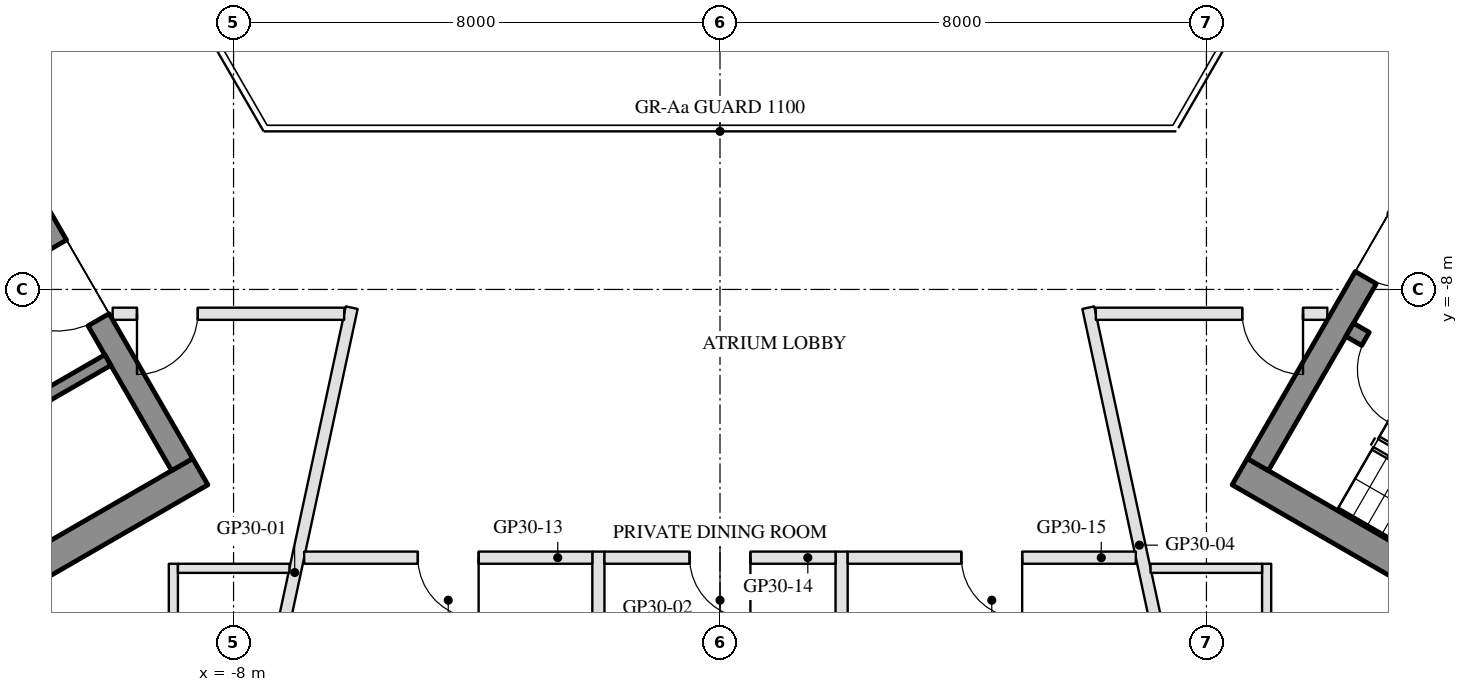
"""IFC4 building model, lengths in metres.
Left out: names, types, materials, properties, quantities, classifications, styles, units other than length and angle.
Written with IfcOpenShell. Run it as: python <this file> out.ifc"""

import sys

from ifc_helpers import new_model, si_unit, direction, frame, frame_2d, origin, place, context, subcontext, project, spatial, rectangle, extrude, element, fill, save


model = new_model("IFC4")
c1 = context("Model", 3, precision=1e-05, world=origin(), true_north=direction((0.0, 1.0)))
c2 = subcontext(c1, "Body", "Model", "MODEL_VIEW")
j1 = project(units=[si_unit("LENGTHUNIT", "METRE"), si_unit("PLANEANGLEUNIT", "RADIAN")], contexts=[c1])
p1 = place(None, origin())
s1 = spatial("IfcSite", under=j1, at=p1, CompositionType="ELEMENT")
p2 = place(p1, origin())
s2 = spatial("IfcBuilding", under=s1, at=p2, CompositionType="ELEMENT")
p3 = place(p2, frame((0.0, 0.0, 298.5)))
s3 = spatial("IfcBuildingStorey", under=s2, at=p3, CompositionType="ELEMENT", Elevation=298.5)
p4 = place(p3, frame((-8.547, -10.997, 0.0), z_axis=(0.0, 0.0, 1.0), x_axis=(-0.866025449148, -0.499999921427, 0.0)))
e1 = element("IfcWall", 1, at=p4, inside=s3, PredefinedType="SHEAR", context=c2, shape_type="SweptSolid", body=[
    extrude(rectangle(XDim=11.222, YDim=0.5, at=frame_2d((5.611, 0.0))), origin(), (0.0, 0.0, 1.0), 3.5),
])
p5 = place(p3, frame((-13.845, -2.22, 0.0), z_axis=(0.0, 0.0, 1.0), x_axis=(0.500004234368, -0.866022959057, 0.0)))
e2 = element("IfcWall", 2, at=p5, inside=s3, PredefinedType="SHEAR", context=c2, shape_type="SweptSolid", body=[
    extrude(rectangle(XDim=10.0, YDim=0.4, at=frame_2d((5.0, 0.0))), origin(), (0.0, 0.0, 1.0), 3.5),
])
p6 = place(p5, frame((3.55, 0.0, 0.0)))
e3 = element("IfcOpeningElement", 3, at=p6, cuts=e2, PredefinedType="OPENING", context=c2, shape_type="SweptSolid", body=[
    extrude(rectangle(XDim=1.1, YDim=2.1, at=frame_2d((0.55, 1.05))), frame((0.0, 0.21, 0.0), z_axis=(0.0, -1.0, 0.0), x_axis=(1.0, 0.0, 0.0)), (0.0, 0.0, 1.0), 0.42),
])
p7 = place(p5, frame((5.85, 0.0, 0.0)))
e4 = element("IfcOpeningElement", 4, at=p7, cuts=e2, PredefinedType="OPENING", context=c2, shape_type="SweptSolid", body=[
    extrude(rectangle(XDim=1.4, YDim=2.1, at=frame_2d((0.7, 1.05))), frame((0.0, 0.21, 0.0), z_axis=(0.0, -1.0, 0.0), x_axis=(1.0, 0.0, 0.0)), (0.0, 0.0, 1.0), 0.42),
])
p8 = place(p3, frame((-10.068, -9.162, 0.0), z_axis=(0.0, 0.0, 1.0), x_axis=(-0.866032725843, -0.499987317609, 0.0)))
e5 = element("IfcWall", 5, at=p8, inside=s3, PredefinedType="SHEAR", context=c2, shape_type="SweptSolid", body=[
    extrude(rectangle(XDim=10.16, YDim=0.2, at=frame_2d((5.08, 0.0))), origin(), (0.0, 0.0, 1.0), 3.5),
])
p9 = place(p8, frame((4.53, 0.0, 0.0)))
e6 = element("IfcOpeningElement", 6, at=p9, cuts=e5, PredefinedType="OPENING", context=c2, shape_type="SweptSolid", body=[
    extrude(rectangle(XDim=0.9, YDim=2.1, at=frame_2d((0.45, 1.05))), frame((0.0, 0.11, 0.0), z_axis=(0.0, -1.0, 0.0), x_axis=(1.0, 0.0, 0.0)), (0.0, 0.0, 1.0), 0.22),
])
p10 = place(p3, frame((8.547, -10.997, 0.0), z_axis=(0.0, 0.0, 1.0), x_axis=(0.866025449148, -0.499999921427, 0.0)))
e7 = element("IfcWall", 7, at=p10, inside=s3, PredefinedType="SHEAR", context=c2, shape_type="SweptSolid", body=[
    extrude(rectangle(XDim=11.222, YDim=0.5, at=frame_2d((5.611, 0.0))), origin(), (0.0, 0.0, 1.0), 3.5),
])
p11 = place(p3, frame((8.845, -10.88, 0.0), z_axis=(0.0, 0.0, 1.0), x_axis=(0.500004234368, 0.866022959057, 0.0)))
e8 = element("IfcWall", 8, at=p11, inside=s3, PredefinedType="SHEAR", context=c2, shape_type="SweptSolid", body=[
    extrude(rectangle(XDim=10.0, YDim=0.4, at=frame_2d((5.0, 0.0))), origin(), (0.0, 0.0, 1.0), 3.5),
])
p12 = place(p11, frame((3.55, 0.0, 0.0)))
e9 = element("IfcOpeningElement", 9, at=p12, cuts=e8, PredefinedType="OPENING", context=c2, shape_type="SweptSolid", body=[
    extrude(rectangle(XDim=1.1, YDim=2.1, at=frame_2d((0.55, 1.05))), frame((0.0, 0.21, 0.0), z_axis=(0.0, -1.0, 0.0), x_axis=(1.0, 0.0, 0.0)), (0.0, 0.0, 1.0), 0.42),
])
p13 = place(p11, frame((5.85, 0.0, 0.0)))
e10 = element("IfcOpeningElement", 10, at=p13, cuts=e8, PredefinedType="OPENING", context=c2, shape_type="SweptSolid", body=[
    extrude(rectangle(XDim=1.4, YDim=2.1, at=frame_2d((0.7, 1.05))), frame((0.0, 0.21, 0.0), z_axis=(0.0, -1.0, 0.0), x_axis=(1.0, 0.0, 0.0)), (0.0, 0.0, 1.0), 0.42),
])
p14 = place(p3, frame((10.356, -8.664, 0.0), z_axis=(0.0, 0.0, 1.0), x_axis=(0.866028629588, -0.499994412703, 0.0)))
e11 = element("IfcWall", 11, at=p14, inside=s3, PredefinedType="SHEAR", context=c2, shape_type="SweptSolid", body=[
    extrude(rectangle(XDim=6.45, YDim=0.25, at=frame_2d((3.225, 0.0))), origin(), (0.0, 0.0, 1.0), 3.5),
])
p15 = place(p14, frame((0.3, 0.0, 0.0)))
e12 = element("IfcOpeningElement", 12, at=p15, cuts=e11, PredefinedType="OPENING", context=c2, shape_type="SweptSolid", body=[
    extrude(rectangle(XDim=1.0, YDim=2.1, at=frame_2d((0.5, 1.05))), frame((0.0, 0.135, 0.0), z_axis=(0.0, -1.0, 0.0), x_axis=(1.0, 0.0, 0.0)), (0.0, 0.0, 1.0), 0.27),
])
p16 = place(p3, frame((-7.93, -17.012, 0.0), z_axis=(0.0, 0.0, 1.0), x_axis=(0.210200768645, 0.97765824134, 0.0)))
e13 = element("IfcWall", 13, at=p16, inside=s3, PredefinedType="PARTITIONING", context=c2, shape_type="SweptSolid", body=[
    extrude(rectangle(XDim=8.911, YDim=0.2, at=frame_2d((4.455, 0.0))), origin(), (0.0, 0.0, 1.0), 3.1),
])
p17 = place(p3, frame((-2.0, -16.112, 0.0), z_axis=(0.0, 0.0, 1.0), x_axis=(0.0, 1.0, 0.0)))
e14 = element("IfcWall", 14, at=p17, inside=s3, PredefinedType="PARTITIONING", context=c2, shape_type="SweptSolid", body=[
    extrude(rectangle(XDim=3.8, YDim=0.2, at=frame_2d((1.9, 0.0))), origin(), (0.0, 0.0, 1.0), 3.1),
])
p18 = place(p3, frame((2.0, -17.012, 0.0), z_axis=(0.0, 0.0, 1.0), x_axis=(0.0, 1.0, 0.0)))
e15 = element("IfcWall", 15, at=p18, inside=s3, PredefinedType="PARTITIONING", context=c2, shape_type="SweptSolid", body=[
    extrude(rectangle(XDim=4.7, YDim=0.2, at=frame_2d((2.35, 0.0))), origin(), (0.0, 0.0, 1.0), 3.1),
])
p19 = place(p3, frame((7.737, -16.112, 0.0), z_axis=(0.0, 0.0, 1.0), x_axis=(-0.210221826162, 0.977653713646, 0.0)))
e16 = element("IfcWall", 16, at=p19, inside=s3, PredefinedType="PARTITIONING", context=c2, shape_type="SweptSolid", body=[
    extrude(rectangle(XDim=7.99, YDim=0.2, at=frame_2d((3.995, 0.0))), origin(), (0.0, 0.0, 1.0), 3.1),
])
p20 = place(p3, frame((-6.181, -8.4, 0.0), z_axis=(0.0, 0.0, 1.0), x_axis=(-1.0, 0.0, 0.0)))
e17 = element("IfcWall", 17, at=p20, inside=s3, PredefinedType="PARTITIONING", context=c2, shape_type="SweptSolid", body=[
    extrude(rectangle(XDim=3.807, YDim=0.2, at=frame_2d((1.904, 0.0))), origin(), (0.0, 0.0, 1.0), 3.1),
])
p21 = place(p20, frame((2.407, 0.0, 0.0)))
e18 = element("IfcOpeningElement", 18, at=p21, cuts=e17, PredefinedType="OPENING", context=c2, shape_type="SweptSolid", body=[
    extrude(rectangle(XDim=1.0, YDim=2.1, at=frame_2d((0.5, 1.05))), frame((0.0, 0.11, 0.0), z_axis=(0.0, -1.0, 0.0), x_axis=(1.0, 0.0, 0.0)), (0.0, 0.0, 1.0), 0.22),
])
p22 = place(p3, frame((-8.99, -12.512, 0.0), z_axis=(0.0, 0.0, 1.0), x_axis=(0.0, -1.0, 0.0)))
e19 = element("IfcWall", 19, at=p22, inside=s3, PredefinedType="PARTITIONING", context=c2, shape_type="SweptSolid", body=[
    extrude(rectangle(XDim=2.8, YDim=0.15, at=frame_2d((1.4, 0.0))), origin(), (0.0, 0.0, 1.0), 3.1),
])
p23 = place(p22, frame((1.4, 0.0, 0.0)))
e20 = element("IfcOpeningElement", 20, at=p23, cuts=e19, PredefinedType="OPENING", context=c2, shape_type="SweptSolid", body=[
    extrude(rectangle(XDim=0.9, YDim=2.1, at=frame_2d((0.45, 1.05))), frame((0.0, 0.085, 0.0), z_axis=(0.0, -1.0, 0.0), x_axis=(1.0, 0.0, 0.0)), (0.0, 0.0, 1.0), 0.17),
])
p24 = place(p3, frame((-8.915, -12.587, 0.0), z_axis=(0.0, 0.0, 1.0), x_axis=(1.0, 0.0, 0.0)))
e21 = element("IfcWall", 21, at=p24, inside=s3, PredefinedType="PARTITIONING", context=c2, shape_type="SweptSolid", body=[
    extrude(rectangle(XDim=1.834, YDim=0.15, at=frame_2d((0.917, 0.0))), origin(), (0.0, 0.0, 1.0), 3.55),
])
p25 = place(p3, frame((-2.1, -12.412, 0.0), z_axis=(0.0, 0.0, 1.0), x_axis=(-1.0, 0.0, 0.0)))
e22 = element("IfcWall", 22, at=p25, inside=s3, PredefinedType="PARTITIONING", context=c2, shape_type="SweptSolid", body=[
    extrude(rectangle(XDim=4.739, YDim=0.2, at=frame_2d((2.369, 0.0))), origin(), (0.0, 0.0, 1.0), 3.1),
])
p26 = place(p25, frame((1.869, 0.0, 0.0)))
e23 = element("IfcOpeningElement", 23, at=p26, cuts=e22, PredefinedType="OPENING", context=c2, shape_type="SweptSolid", body=[
    extrude(rectangle(XDim=1.0, YDim=2.1, at=frame_2d((0.5, 1.05))), frame((0.0, 0.11, 0.0), z_axis=(0.0, -1.0, 0.0), x_axis=(1.0, 0.0, 0.0)), (0.0, 0.0, 1.0), 0.22),
])
p27 = place(p3, frame((1.9, -12.412, 0.0), z_axis=(0.0, 0.0, 1.0), x_axis=(-1.0, 0.0, 0.0)))
e24 = element("IfcWall", 24, at=p27, inside=s3, PredefinedType="PARTITIONING", context=c2, shape_type="SweptSolid", body=[
    extrude(rectangle(XDim=3.8, YDim=0.2, at=frame_2d((1.9, 0.0))), origin(), (0.0, 0.0, 1.0), 3.1),
])
p28 = place(p27, frame((1.4, 0.0, 0.0)))
e25 = element("IfcOpeningElement", 25, at=p28, cuts=e24, PredefinedType="OPENING", context=c2, shape_type="SweptSolid", body=[
    extrude(rectangle(XDim=1.0, YDim=2.1, at=frame_2d((0.5, 1.05))), frame((0.0, 0.11, 0.0), z_axis=(0.0, -1.0, 0.0), x_axis=(1.0, 0.0, 0.0)), (0.0, 0.0, 1.0), 0.22),
])
p29 = place(p3, frame((6.839, -12.412, 0.0), z_axis=(0.0, 0.0, 1.0), x_axis=(-1.0, 0.0, 0.0)))
e26 = element("IfcWall", 26, at=p29, inside=s3, PredefinedType="PARTITIONING", context=c2, shape_type="SweptSolid", body=[
    extrude(rectangle(XDim=4.739, YDim=0.2, at=frame_2d((2.369, 0.0))), origin(), (0.0, 0.0, 1.0), 3.1),
])
p30 = place(p29, frame((1.869, 0.0, 0.0)))
e27 = element("IfcOpeningElement", 27, at=p30, cuts=e26, PredefinedType="OPENING", context=c2, shape_type="SweptSolid", body=[
    extrude(rectangle(XDim=1.0, YDim=2.1, at=frame_2d((0.5, 1.05))), frame((0.0, 0.11, 0.0), z_axis=(0.0, -1.0, 0.0), x_axis=(1.0, 0.0, 0.0)), (0.0, 0.0, 1.0), 0.22),
])
p31 = place(p3, frame((9.988, -8.4, 0.0), z_axis=(0.0, 0.0, 1.0), x_axis=(-1.0, 0.0, 0.0)))
e28 = element("IfcWall", 28, at=p31, inside=s3, PredefinedType="PARTITIONING", context=c2, shape_type="SweptSolid", body=[
    extrude(rectangle(XDim=3.807, YDim=0.2, at=frame_2d((1.904, 0.0))), origin(), (0.0, 0.0, 1.0), 3.1),
])
p32 = place(p31, frame((0.4, 0.0, 0.0)))
e29 = element("IfcOpeningElement", 29, at=p32, cuts=e28, PredefinedType="OPENING", context=c2, shape_type="SweptSolid", body=[
    extrude(rectangle(XDim=1.0, YDim=2.1, at=frame_2d((0.5, 1.05))), frame((0.0, 0.11, 0.0), z_axis=(0.0, -1.0, 0.0), x_axis=(1.0, 0.0, 0.0)), (0.0, 0.0, 1.0), 0.22),
])
p33 = place(p3, frame((8.99, -15.312, 0.0), z_axis=(0.0, 0.0, 1.0), x_axis=(0.0, 1.0, 0.0)))
e30 = element("IfcWall", 30, at=p33, inside=s3, PredefinedType="PARTITIONING", context=c2, shape_type="SweptSolid", body=[
    extrude(rectangle(XDim=2.8, YDim=0.15, at=frame_2d((1.4, 0.0))), origin(), (0.0, 0.0, 1.0), 3.1),
])
p34 = place(p33, frame((0.5, 0.0, 0.0)))
e31 = element("IfcOpeningElement", 31, at=p34, cuts=e30, PredefinedType="OPENING", context=c2, shape_type="SweptSolid", body=[
    extrude(rectangle(XDim=0.9, YDim=2.1, at=frame_2d((0.45, 1.05))), frame((0.0, 0.085, 0.0), z_axis=(0.0, -1.0, 0.0), x_axis=(1.0, 0.0, 0.0)), (0.0, 0.0, 1.0), 0.17),
])
p35 = place(p3, frame((7.081, -12.587, 0.0), z_axis=(0.0, 0.0, 1.0), x_axis=(1.0, 0.0, 0.0)))
e32 = element("IfcWall", 32, at=p35, inside=s3, PredefinedType="PARTITIONING", context=c2, shape_type="SweptSolid", body=[
    extrude(rectangle(XDim=1.834, YDim=0.15, at=frame_2d((0.917, 0.0))), origin(), (0.0, 0.0, 1.0), 3.55),
])
p36 = place(p3, frame((8.275, 2.468, 0.0), z_axis=(0.0, 0.0, 1.0), x_axis=(0.500004647933, -0.866022720283, 0.0)))
e33 = element("IfcWall", 33, at=p36, inside=s3, PredefinedType="PARTITIONING", context=c2, shape_type="SweptSolid", body=[
    extrude(rectangle(XDim=7.988, YDim=0.2, at=frame_2d((3.994, 0.0))), origin(), (0.0, 0.0, 1.0), 3.1),
])
p37 = place(p36, frame((2.45, 0.0, 0.0)))
e34 = element("IfcOpeningElement", 34, at=p37, cuts=e33, PredefinedType="OPENING", context=c2, shape_type="SweptSolid", body=[
    extrude(rectangle(XDim=1.0, YDim=2.1, at=frame_2d((0.5, 1.05))), frame((0.0, 0.11, 0.0), z_axis=(0.0, -1.0, 0.0), x_axis=(1.0, 0.0, 0.0)), (0.0, 0.0, 1.0), 0.22),
])
p38 = place(p3, frame((-12.269, -4.45, 0.0), z_axis=(0.0, 0.0, 1.0), x_axis=(0.500016364551, 0.8660159555, 0.0)))
e35 = element("IfcWall", 35, at=p38, inside=s3, PredefinedType="PARTITIONING", context=c2, shape_type="SweptSolid", body=[
    extrude(rectangle(XDim=10.091, YDim=0.2, at=frame_2d((5.045, 0.0))), origin(), (0.0, 0.0, 1.0), 3.1),
])
p39 = place(p38, frame((6.638, 0.0, 0.0)))
e36 = element("IfcOpeningElement", 36, at=p39, cuts=e35, PredefinedType="OPENING", context=c2, shape_type="SweptSolid", body=[
    extrude(rectangle(XDim=1.0, YDim=2.1, at=frame_2d((0.5, 1.05))), frame((0.0, 0.11, 0.0), z_axis=(0.0, -1.0, 0.0), x_axis=(1.0, 0.0, 0.0)), (0.0, 0.0, 1.0), 0.22),
])
p40 = place(p7, frame((1.4, 0.0, 0.0), z_axis=(0.0, 0.0, 1.0), x_axis=(-1.0, 0.0, 0.0)))
e37 = element("IfcDoor", 37, at=p40, inside=s3, OperationType="DOUBLE_DOOR_SINGLE_SWING", PredefinedType="DOOR", context=c2, shape_type="SweptSolid", body=[
    extrude(rectangle(XDim=1.4, YDim=2.1, at=frame_2d((0.7, 1.05))), frame((0.0, 0.025, 0.0), z_axis=(0.0, -1.0, 0.0), x_axis=(1.0, 0.0, 0.0)), (0.0, 0.0, 1.0), 0.05),
])
fill(e4, e37)
p41 = place(p12, frame((1.1, 0.0, 0.0), z_axis=(0.0, 0.0, 1.0), x_axis=(-1.0, 0.0, 0.0)))
e38 = element("IfcDoor", 38, at=p41, inside=s3, OperationType="SINGLE_SWING_LEFT", PredefinedType="DOOR", context=c2, shape_type="SweptSolid", body=[
    extrude(rectangle(XDim=1.1, YDim=2.1, at=frame_2d((0.55, 1.05))), frame((0.0, 0.025, 0.0), z_axis=(0.0, -1.0, 0.0), x_axis=(1.0, 0.0, 0.0)), (0.0, 0.0, 1.0), 0.05),
])
fill(e9, e38)
p42 = place(p15, frame((1.0, 0.0, 0.0), z_axis=(0.0, 0.0, 1.0), x_axis=(-1.0, 0.0, 0.0)))
e39 = element("IfcDoor", 39, at=p42, inside=s3, OperationType="SINGLE_SWING_LEFT", PredefinedType="DOOR", context=c2, shape_type="SweptSolid", body=[
    extrude(rectangle(XDim=1.0, YDim=2.1, at=frame_2d((0.5, 1.05))), frame((0.0, 0.025, 0.0), z_axis=(0.0, -1.0, 0.0), x_axis=(1.0, 0.0, 0.0)), (0.0, 0.0, 1.0), 0.05),
])
fill(e12, e39)
p43 = place(p21, origin())
e40 = element("IfcDoor", 40, at=p43, inside=s3, OperationType="SINGLE_SWING_RIGHT", PredefinedType="DOOR", context=c2, shape_type="SweptSolid", body=[
    extrude(rectangle(XDim=1.0, YDim=2.1, at=frame_2d((0.5, 1.05))), frame((0.0, 0.025, 0.0), z_axis=(0.0, -1.0, 0.0), x_axis=(1.0, 0.0, 0.0)), (0.0, 0.0, 1.0), 0.05),
])
fill(e18, e40)
p44 = place(p26, origin())
e41 = element("IfcDoor", 41, at=p44, inside=s3, OperationType="SINGLE_SWING_LEFT", PredefinedType="DOOR", context=c2, shape_type="SweptSolid", body=[
    extrude(rectangle(XDim=1.0, YDim=2.1, at=frame_2d((0.5, 1.05))), frame((0.0, 0.025, 0.0), z_axis=(0.0, -1.0, 0.0), x_axis=(1.0, 0.0, 0.0)), (0.0, 0.0, 1.0), 0.05),
])
fill(e23, e41)
p45 = place(p28, origin())
e42 = element("IfcDoor", 42, at=p45, inside=s3, OperationType="SINGLE_SWING_LEFT", PredefinedType="DOOR", context=c2, shape_type="SweptSolid", body=[
    extrude(rectangle(XDim=1.0, YDim=2.1, at=frame_2d((0.5, 1.05))), frame((0.0, 0.025, 0.0), z_axis=(0.0, -1.0, 0.0), x_axis=(1.0, 0.0, 0.0)), (0.0, 0.0, 1.0), 0.05),
])
fill(e25, e42)
p46 = place(p30, origin())
e43 = element("IfcDoor", 43, at=p46, inside=s3, OperationType="SINGLE_SWING_LEFT", PredefinedType="DOOR", context=c2, shape_type="SweptSolid", body=[
    extrude(rectangle(XDim=1.0, YDim=2.1, at=frame_2d((0.5, 1.05))), frame((0.0, 0.025, 0.0), z_axis=(0.0, -1.0, 0.0), x_axis=(1.0, 0.0, 0.0)), (0.0, 0.0, 1.0), 0.05),
])
fill(e27, e43)
p47 = place(p32, origin())
e44 = element("IfcDoor", 44, at=p47, inside=s3, OperationType="SINGLE_SWING_LEFT", PredefinedType="DOOR", context=c2, shape_type="SweptSolid", body=[
    extrude(rectangle(XDim=1.0, YDim=2.1, at=frame_2d((0.5, 1.05))), frame((0.0, 0.025, 0.0), z_axis=(0.0, -1.0, 0.0), x_axis=(1.0, 0.0, 0.0)), (0.0, 0.0, 1.0), 0.05),
])
fill(e29, e44)
save(model, sys.argv[1])
